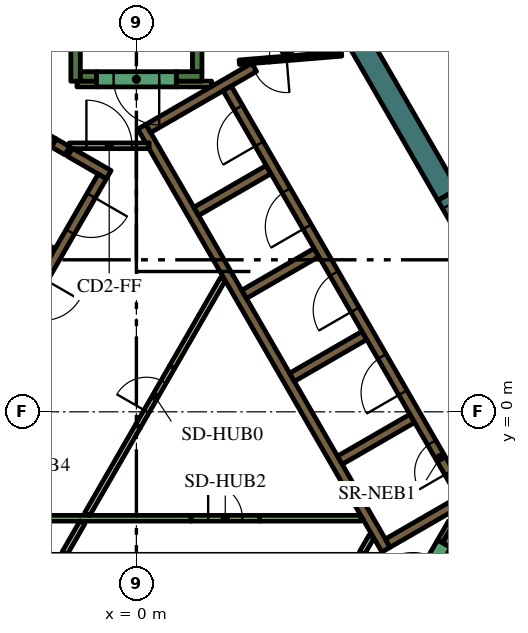
"""IFC4 building model, lengths in metres.
Left out: names, types, materials, properties, quantities, classifications, styles, units other than length and angle.
Written with IfcOpenShell. Run it as: python <this file> out.ifc"""

import sys

from ifc_helpers import new_model, si_unit, direction, frame, frame_2d, origin, place, context, subcontext, project, spatial, polyline, rectangle, outline, extrude, element, fill, save


model = new_model("IFC4")
c1 = context("Model", 3, precision=1e-05, world=origin(), true_north=direction((0.0, 1.0)))
c2 = subcontext(c1, "Body", "Model", "MODEL_VIEW")
j1 = project(units=[si_unit("LENGTHUNIT", "METRE"), si_unit("PLANEANGLEUNIT", "RADIAN")], contexts=[c1])
p1 = place(None, origin())
s1 = spatial("IfcSite", under=j1, at=p1, CompositionType="ELEMENT")
p2 = place(p1, origin())
s2 = spatial("IfcBuilding", under=s1, at=p2, CompositionType="ELEMENT")
p3 = place(p2, frame((0.0, 0.0, 288.0)))
s3 = spatial("IfcBuildingStorey", under=s2, at=p3, CompositionType="ELEMENT", Elevation=288.0)
p4 = place(p3, frame((1.989, 16.456, 0.0), z_axis=(0.0, 0.0, 1.0), x_axis=(0.49999102663, -0.8660305845, 0.0)))
e1 = element("IfcWall", 1, at=p4, inside=s3, PredefinedType="SOLIDWALL", context=c2, shape_type="SweptSolid", body=[
    extrude(rectangle(XDim=12.406, YDim=0.6, at=frame_2d((6.203, 0.0))), origin(), (0.0, 0.0, 1.0), 4.2),
])
p5 = place(p3, frame((8.163, -3.511, 0.0), z_axis=(0.0, 0.0, 1.0), x_axis=(0.500127794843, 0.865951608824, 0.0)))
e2 = element("IfcWall", 2, at=p5, inside=s3, PredefinedType="SOLIDWALL", context=c2, shape_type="SweptSolid", body=[
    extrude(rectangle(XDim=0.435, YDim=0.25, at=frame_2d((0.217, 0.0))), origin(), (0.0, 0.0, 1.0), 4.2),
])
p6 = place(p3, frame((1.6, 8.95, 0.0), z_axis=(0.0, 0.0, 1.0), x_axis=(0.0, 1.0, 0.0)))
e3 = element("IfcWall", 3, at=p6, inside=s3, PredefinedType="SOLIDWALL", context=c2, shape_type="SweptSolid", body=[
    extrude(rectangle(XDim=6.8, YDim=0.25, at=frame_2d((3.4, 0.0))), origin(), (0.0, 0.0, 1.0), 4.2),
])
p7 = place(p3, frame((1.05, 8.825, 0.0), z_axis=(0.0, 0.0, 1.0), x_axis=(1.0, 0.0, 0.0)))
e4 = element("IfcWall", 4, at=p7, inside=s3, PredefinedType="SOLIDWALL", context=c2, shape_type="SweptSolid", body=[
    extrude(rectangle(XDim=0.675, YDim=0.25, at=frame_2d((0.337, 0.0))), origin(), (0.0, 0.0, 1.0), 4.2),
])
p8 = place(p3, frame((-1.6, 8.7, 0.0), z_axis=(0.0, 0.0, 1.0), x_axis=(0.0, 1.0, 0.0)))
e5 = element("IfcWall", 5, at=p8, inside=s3, PredefinedType="SOLIDWALL", context=c2, shape_type="SweptSolid", body=[
    extrude(rectangle(XDim=7.05, YDim=0.25, at=frame_2d((3.525, 0.0))), origin(), (0.0, 0.0, 1.0), 4.2),
])
p9 = place(p3, frame((-1.475, 8.825, 0.0), z_axis=(0.0, 0.0, 1.0), x_axis=(1.0, 0.0, 0.0)))
e6 = element("IfcWall", 6, at=p9, inside=s3, PredefinedType="SOLIDWALL", context=c2, shape_type="SweptSolid", body=[
    extrude(rectangle(XDim=0.425, YDim=0.25, at=frame_2d((0.212, 0.0))), origin(), (0.0, 0.0, 1.0), 4.2),
])
p10 = place(p3, origin())
e7 = element("IfcWall", 7, at=p10, inside=s3, PredefinedType="SOLIDWALL", context=c2, shape_type="SweptSolid", body=[
    extrude(outline(polyline([(0.332, 6.925), (0.335, 6.925), (0.335, 6.925), (0.335, 6.925), (0.335, 7.075), (0.335, 7.075), (0.335, 7.075), (0.245, 7.075), (0.035, 7.439), (0.252, 7.564), (0.377, 7.348), (1.512, 5.382), (1.637, 5.165), (2.221, 4.153), (2.771, 3.199), (2.896, 2.983), (3.138, 2.564), (4.031, 1.017), (4.156, 0.801), (5.292, -1.165), (5.417, -1.382), (6.073, -2.519), (6.552, -3.348), (6.677, -3.564), (6.46, -3.689), (0.332, 6.925)])), origin(), (0.0, 0.0, 1.0), 4.2),
])
p11 = place(p3, frame((3.1, 9.064, 0.0), z_axis=(0.0, 0.0, 1.0), x_axis=(-0.866030133475, -0.499991807846, 0.0)))
e8 = element("IfcWall", 8, at=p11, inside=s3, PredefinedType="SOLIDWALL", context=c2, shape_type="SweptSolid", body=[
    extrude(rectangle(XDim=3.217, YDim=0.25, at=frame_2d((1.608, 0.0))), origin(), (0.0, 0.0, 1.0), 4.2),
])
p12 = place(p3, frame((1.574, 5.274, 0.0), z_axis=(0.0, 0.0, 1.0), x_axis=(0.866028486751, 0.499994660107, 0.0)))
e9 = element("IfcWall", 9, at=p12, inside=s3, PredefinedType="SOLIDWALL", context=c2, shape_type="SweptSolid", body=[
    extrude(rectangle(XDim=2.2, YDim=0.25, at=frame_2d((1.1, 0.0))), origin(), (0.0, 0.0, 1.0), 4.2),
])
for number, where, z_axis, x_axis in (
    (10, (2.834, 3.091, 0.0), (0.0, 0.0, 1.0), (0.866, 0.5, 0.0)),
    (11, (4.094, 0.909, 0.0), (0.0, 0.0, 1.0), (0.866, 0.5, 0.0)),
    (12, (5.354, -1.274, 0.0), (0.0, 0.0, 1.0), (0.866, 0.5, 0.0)),
):
    element("IfcWall", number, at=place(p3, frame(where, z_axis=z_axis, x_axis=x_axis)), inside=s3, PredefinedType="SOLIDWALL", context=c2, shape_type="SweptSolid", body=[
        extrude(rectangle(XDim=2.2, YDim=0.25, at=frame_2d((1.1, 0.0))), origin(), (0.0, 0.0, 1.0), 4.2),
    ])
p13 = place(p3, frame((11.507, -0.631, 0.0), z_axis=(0.0, 0.0, 1.0), x_axis=(-0.866011447264, -0.500024172624, 0.0)))
e13 = element("IfcWall", 13, at=p13, inside=s3, PredefinedType="SOLIDWALL", context=c2, shape_type="SweptSolid", body=[
    extrude(rectangle(XDim=5.65, YDim=0.25, at=frame_2d((2.825, 0.0))), origin(), (0.0, 0.0, 1.0), 4.2),
])
p14 = place(p3, frame((3.83, 9.486, 0.0), z_axis=(0.0, 0.0, 1.0), x_axis=(0.865986202621, 0.500067892261, 0.0)))
e14 = element("IfcWall", 14, at=p14, inside=s3, PredefinedType="SOLIDWALL", context=c2, shape_type="SweptSolid", body=[
    extrude(rectangle(XDim=1.591, YDim=0.25, at=frame_2d((0.795, 0.0))), origin(), (0.0, 0.0, 1.0), 4.2),
])
p15 = place(p3, frame((-1.819, 6.87, 0.0), z_axis=(0.0, 0.0, 1.0), x_axis=(-0.866294599386, 0.499533449405, 0.0)))
e15 = element("IfcWall", 15, at=p15, inside=s3, PredefinedType="SOLIDWALL", context=c2, shape_type="SweptSolid", body=[
    extrude(rectangle(XDim=0.41, YDim=0.25, at=frame_2d((0.205, 0.0))), origin(), (0.0, 0.0, 1.0), 4.2),
])
p16 = place(p3, frame((-2.849, 7.465, 0.0), z_axis=(0.0, 0.0, 1.0), x_axis=(0.865955664968, -0.500120771724, 0.0)))
e16 = element("IfcWall", 16, at=p16, inside=s3, PredefinedType="SOLIDWALL", context=c2, shape_type="SweptSolid", body=[
    extrude(rectangle(XDim=0.778, YDim=0.25, at=frame_2d((0.389, 0.0))), origin(), (0.0, 0.0, 1.0), 4.2),
])
p17 = place(p3, frame((-0.728, 6.24, 0.0), z_axis=(0.0, 0.0, 1.0), x_axis=(-0.866002680491, 0.500039355833, 0.0)))
e17 = element("IfcWall", 17, at=p17, inside=s3, PredefinedType="SOLIDWALL", context=c2, shape_type="SweptSolid", body=[
    extrude(rectangle(XDim=1.178, YDim=0.25, at=frame_2d((0.589, 0.0))), origin(), (0.0, 0.0, 1.0), 4.2),
])
p18 = place(p3, frame((-2.204, 4.182, 0.0), z_axis=(0.0, 0.0, 1.0), x_axis=(-0.866008176907, 0.50002983664, 0.0)))
e18 = element("IfcWall", 18, at=p18, inside=s3, PredefinedType="SOLIDWALL", context=c2, shape_type="SweptSolid", body=[
    extrude(rectangle(XDim=2.2, YDim=0.25, at=frame_2d((1.1, 0.0))), origin(), (0.0, 0.0, 1.0), 4.2),
])
p19 = place(p3, frame((0.941, 1.179, 0.0), z_axis=(0.0, 0.0, 1.0), x_axis=(0.499962406319, 0.866047107418, 0.0)))
e19 = element("IfcWall", 19, at=p19, inside=s3, PredefinedType="PARTITIONING", context=c2, shape_type="SweptSolid", body=[
    extrude(rectangle(XDim=2.672, YDim=0.15, at=frame_2d((1.336, 0.0))), origin(), (0.0, 0.0, 1.0), 3.55),
])
p20 = place(p3, frame((1.438, -2.8, 0.0), z_axis=(0.0, 0.0, 1.0), x_axis=(-1.0, 0.0, 0.0)))
e20 = element("IfcWall", 20, at=p20, inside=s3, PredefinedType="PARTITIONING", context=c2, shape_type="SweptSolid", body=[
    extrude(rectangle(XDim=7.781, YDim=0.15, at=frame_2d((3.891, 0.0))), origin(), (0.0, 0.0, 1.0), 3.55),
])
p21 = place(p3, frame((-1.418, -2.907, 0.0), z_axis=(0.0, 0.0, 1.0), x_axis=(-0.499978056798, -0.866038072327, 0.0)))
e21 = element("IfcWall", 21, at=p21, inside=s3, PredefinedType="PARTITIONING", context=c2, shape_type="SweptSolid", body=[
    extrude(rectangle(XDim=0.937, YDim=0.15, at=frame_2d((0.469, 0.0))), origin(), (0.0, 0.0, 1.0), 3.55),
])
for number, where, z_axis, x_axis in (
    (22, (-1.295, -2.693, 0.0), (0.0, 0.0, 1.0), (0.5, 0.866, 0.0)),
    (23, (3.238, -2.8, 0.0), (0.0, 0.0, 1.0), (1.0, 0.0, 0.0)),
):
    element("IfcWall", number, at=place(p3, frame(where, z_axis=z_axis, x_axis=x_axis)), inside=s3, PredefinedType="PARTITIONING", context=c2, shape_type="SweptSolid", body=[
        extrude(rectangle(XDim=2.672, YDim=0.15, at=frame_2d((1.336, 0.0))), origin(), (0.0, 0.0, 1.0), 3.55),
    ])
p22 = place(p3, frame((1.05, 8.625, 0.0), z_axis=(0.0, 0.0, 1.0), x_axis=(1.0, 0.0, 0.0)))
e24 = element("IfcWall", 24, at=p22, inside=s3, PredefinedType="PARTITIONING", context=c2, shape_type="SweptSolid", body=[
    extrude(rectangle(XDim=0.929, YDim=0.15, at=frame_2d((0.464, 0.0))), origin(), (0.0, 0.0, 1.0), 3.55),
])
p23 = place(p3, frame((-1.564, 8.625, 0.0), z_axis=(0.0, 0.0, 1.0), x_axis=(1.0, 0.0, 0.0)))
e25 = element("IfcWall", 25, at=p23, inside=s3, PredefinedType="PARTITIONING", context=c2, shape_type="SweptSolid", body=[
    extrude(rectangle(XDim=0.514, YDim=0.15, at=frame_2d((0.257, 0.0))), origin(), (0.0, 0.0, 1.0), 3.55),
])
p24 = place(p3, frame((8.281, -2.907, 0.0), z_axis=(0.0, 0.0, 1.0), x_axis=(-0.500193841991, -0.86591346013, 0.0)))
e26 = element("IfcWall", 26, at=p24, inside=s3, PredefinedType="PARTITIONING", context=c2, shape_type="SweptSolid", body=[
    extrude(rectangle(XDim=0.583, YDim=0.15, at=frame_2d((0.292, 0.0))), origin(), (0.0, 0.0, 1.0), 4.2),
])
p25 = place(p3, frame((5.936, -3.718, 0.0), z_axis=(0.0, 0.0, 1.0), x_axis=(0.499890179513, 0.866088799389, 0.0)))
e27 = element("IfcWall", 27, at=p25, inside=s3, PredefinedType="PARTITIONING", context=c2, shape_type="SweptSolid", body=[
    extrude(rectangle(XDim=0.504, YDim=0.15, at=frame_2d((0.252, 0.0))), origin(), (0.0, 0.0, 1.0), 3.55),
])
p26 = place(p3, frame((8.565, -2.185, 0.0), z_axis=(0.0, 0.0, 1.0), x_axis=(-0.499997954832, 0.866026584559, 0.0)))
e28 = element("IfcWall", 28, at=p26, inside=s3, PredefinedType="SOLIDWALL", context=c2, shape_type="SweptSolid", body=[
    extrude(rectangle(XDim=12.35, YDim=0.25, at=frame_2d((6.175, 0.0))), origin(), (0.0, 0.0, 1.0), 4.2),
])
p27 = place(p26, frame((0.685, 0.0, 0.0)))
e29 = element("IfcOpeningElement", 29, at=p27, cuts=e28, PredefinedType="OPENING", context=c2, shape_type="SweptSolid", body=[
    extrude(rectangle(XDim=0.9, YDim=2.1, at=frame_2d((0.45, 1.05))), frame((0.0, 0.135, 0.0), z_axis=(0.0, -1.0, 0.0), x_axis=(1.0, 0.0, 0.0)), (0.0, 0.0, 1.0), 0.27),
])
p28 = place(p26, frame((3.105, 0.0, 0.0)))
e30 = element("IfcOpeningElement", 30, at=p28, cuts=e28, PredefinedType="OPENING", context=c2, shape_type="SweptSolid", body=[
    extrude(rectangle(XDim=1.1, YDim=2.1, at=frame_2d((0.55, 1.05))), frame((0.0, 0.135, 0.0), z_axis=(0.0, -1.0, 0.0), x_axis=(1.0, 0.0, 0.0)), (0.0, 0.0, 1.0), 0.27),
])
p29 = place(p26, frame((5.625, 0.0, 0.0)))
e31 = element("IfcOpeningElement", 31, at=p29, cuts=e28, PredefinedType="OPENING", context=c2, shape_type="SweptSolid", body=[
    extrude(rectangle(XDim=1.1, YDim=2.1, at=frame_2d((0.55, 1.05))), frame((0.0, 0.135, 0.0), z_axis=(0.0, -1.0, 0.0), x_axis=(1.0, 0.0, 0.0)), (0.0, 0.0, 1.0), 0.27),
])
p30 = place(p26, frame((8.145, 0.0, 0.0)))
e32 = element("IfcOpeningElement", 32, at=p30, cuts=e28, PredefinedType="OPENING", context=c2, shape_type="SweptSolid", body=[
    extrude(rectangle(XDim=1.1, YDim=2.1, at=frame_2d((0.55, 1.05))), frame((0.0, 0.135, 0.0), z_axis=(0.0, -1.0, 0.0), x_axis=(1.0, 0.0, 0.0)), (0.0, 0.0, 1.0), 0.27),
])
p31 = place(p26, frame((10.665, 0.0, 0.0)))
e33 = element("IfcOpeningElement", 33, at=p31, cuts=e28, PredefinedType="OPENING", context=c2, shape_type="SweptSolid", body=[
    extrude(rectangle(XDim=1.1, YDim=2.1, at=frame_2d((0.55, 1.05))), frame((0.0, 0.135, 0.0), z_axis=(0.0, -1.0, 0.0), x_axis=(1.0, 0.0, 0.0)), (0.0, 0.0, 1.0), 0.27),
])
p32 = place(p3, frame((-0.898, 6.194, 0.0), z_axis=(0.0, 0.0, 1.0), x_axis=(-0.499996202215, -0.866027596426, 0.0)))
e34 = element("IfcWall", 34, at=p32, inside=s3, PredefinedType="SOLIDWALL", context=c2, shape_type="SweptSolid", body=[
    extrude(rectangle(XDim=9.83, YDim=0.25, at=frame_2d((4.915, 0.0))), origin(), (0.0, 0.0, 1.0), 4.2),
])
p33 = place(p32, frame((0.585, 0.0, 0.0)))
e35 = element("IfcOpeningElement", 35, at=p33, cuts=e34, PredefinedType="OPENING", context=c2, shape_type="SweptSolid", body=[
    extrude(rectangle(XDim=1.1, YDim=2.1, at=frame_2d((0.55, 1.05))), frame((0.0, 0.135, 0.0), z_axis=(0.0, -1.0, 0.0), x_axis=(1.0, 0.0, 0.0)), (0.0, 0.0, 1.0), 0.27),
])
p34 = place(p32, frame((3.105, 0.0, 0.0)))
e36 = element("IfcOpeningElement", 36, at=p34, cuts=e34, PredefinedType="OPENING", context=c2, shape_type="SweptSolid", body=[
    extrude(rectangle(XDim=1.1, YDim=2.1, at=frame_2d((0.55, 1.05))), frame((0.0, 0.135, 0.0), z_axis=(0.0, -1.0, 0.0), x_axis=(1.0, 0.0, 0.0)), (0.0, 0.0, 1.0), 0.27),
])
p35 = place(p32, frame((5.625, 0.0, 0.0)))
e37 = element("IfcOpeningElement", 37, at=p35, cuts=e34, PredefinedType="OPENING", context=c2, shape_type="SweptSolid", body=[
    extrude(rectangle(XDim=1.1, YDim=2.1, at=frame_2d((0.55, 1.05))), frame((0.0, 0.135, 0.0), z_axis=(0.0, -1.0, 0.0), x_axis=(1.0, 0.0, 0.0)), (0.0, 0.0, 1.0), 0.27),
])
p36 = place(p32, frame((8.145, 0.0, 0.0)))
e38 = element("IfcOpeningElement", 38, at=p36, cuts=e34, PredefinedType="OPENING", context=c2, shape_type="SweptSolid", body=[
    extrude(rectangle(XDim=1.1, YDim=2.1, at=frame_2d((0.55, 1.05))), frame((0.0, 0.135, 0.0), z_axis=(0.0, -1.0, 0.0), x_axis=(1.0, 0.0, 0.0)), (0.0, 0.0, 1.0), 0.27),
])
p37 = place(p3, frame((7.048, -5.292, 0.0), z_axis=(0.0, 0.0, 1.0), x_axis=(0.49994051562, 0.866059744384, 0.0)))
e39 = element("IfcWall", 39, at=p37, inside=s3, PredefinedType="SOLIDWALL", context=c2, shape_type="SweptSolid", body=[
    extrude(rectangle(XDim=2.1, YDim=0.4, at=frame_2d((1.05, 0.0))), origin(), (0.0, 0.0, 1.0), 4.2),
])
p38 = place(p37, frame((0.45, 0.0, 0.0)))
e40 = element("IfcOpeningElement", 40, at=p38, cuts=e39, PredefinedType="OPENING", context=c2, shape_type="SweptSolid", body=[
    extrude(rectangle(XDim=1.2, YDim=2.1, at=frame_2d((0.6, 1.05))), frame((0.0, 0.21, 0.0), z_axis=(0.0, -1.0, 0.0), x_axis=(1.0, 0.0, 0.0)), (0.0, 0.0, 1.0), 0.42),
])
p39 = place(p3, frame((1.05, 8.75, 0.0), z_axis=(0.0, 0.0, 1.0), x_axis=(-1.0, 0.0, 0.0)))
e41 = element("IfcWall", 41, at=p39, inside=s3, PredefinedType="SOLIDWALL", context=c2, shape_type="SweptSolid", body=[
    extrude(rectangle(XDim=2.1, YDim=0.4, at=frame_2d((1.05, 0.0))), origin(), (0.0, 0.0, 1.0), 4.2),
])
p40 = place(p39, frame((0.45, 0.0, 0.0)))
e42 = element("IfcOpeningElement", 42, at=p40, cuts=e41, PredefinedType="OPENING", context=c2, shape_type="SweptSolid", body=[
    extrude(rectangle(XDim=1.2, YDim=2.1, at=frame_2d((0.6, 1.05))), frame((0.0, 0.21, 0.0), z_axis=(0.0, -1.0, 0.0), x_axis=(1.0, 0.0, 0.0)), (0.0, 0.0, 1.0), 0.42),
])
p41 = place(p3, frame((5.398, 9.419, 0.0), z_axis=(0.0, 0.0, 1.0), x_axis=(-0.996653416376, -0.081743303248, 0.0)))
e43 = element("IfcWall", 43, at=p41, inside=s3, PredefinedType="PARTITIONING", context=c2, shape_type="SweptSolid", body=[
    extrude(rectangle(XDim=2.7, YDim=0.12, at=frame_2d((1.35, 0.0))), origin(), (0.0, 0.0, 1.0), 3.55),
])
p42 = place(p41, frame((1.45, 0.0, 0.0)))
e44 = element("IfcOpeningElement", 44, at=p42, cuts=e43, PredefinedType="OPENING", context=c2, shape_type="SweptSolid", body=[
    extrude(rectangle(XDim=0.9, YDim=2.1, at=frame_2d((0.45, 1.05))), frame((0.0, 0.07, 0.0), z_axis=(0.0, -1.0, 0.0), x_axis=(1.0, 0.0, 0.0)), (0.0, 0.0, 1.0), 0.14),
])
p43 = place(p3, frame((-1.765, 7.0, 0.0), z_axis=(0.0, 0.0, 1.0), x_axis=(1.0, 0.0, 0.0)))
e45 = element("IfcWall", 45, at=p43, inside=s3, PredefinedType="PARTITIONING", context=c2, shape_type="SweptSolid", body=[
    extrude(rectangle(XDim=2.1, YDim=0.15, at=frame_2d((1.05, 0.0))), origin(), (0.0, 0.0, 1.0), 3.55),
])
p44 = place(p43, frame((0.45, 0.0, 0.0)))
e46 = element("IfcOpeningElement", 46, at=p44, cuts=e45, PredefinedType="OPENING", context=c2, shape_type="SweptSolid", body=[
    extrude(rectangle(XDim=1.2, YDim=2.1, at=frame_2d((0.6, 1.05))), frame((0.0, 0.085, 0.0), z_axis=(0.0, -1.0, 0.0), x_axis=(1.0, 0.0, 0.0)), (0.0, 0.0, 1.0), 0.17),
])
p45 = place(p3, frame((8.192, 5.711, 0.0), z_axis=(0.0, 0.0, 1.0), x_axis=(0.500062241894, -0.865989465428, 0.0)))
e47 = element("IfcWall", 47, at=p45, inside=s3, PredefinedType="SOLIDWALL", context=c2, shape_type="SweptSolid", body=[
    extrude(rectangle(XDim=1.7, YDim=0.6, at=frame_2d((0.85, 0.0))), origin(), (0.0, 0.0, 1.0), 4.2),
])
p46 = place(p45, frame((0.25, 0.0, 0.0)))
e48 = element("IfcOpeningElement", 48, at=p46, cuts=e47, PredefinedType="OPENING", context=c2, shape_type="SweptSolid", body=[
    extrude(rectangle(XDim=1.2, YDim=2.1, at=frame_2d((0.6, 1.05))), frame((0.0, 0.31, 0.0), z_axis=(0.0, -1.0, 0.0), x_axis=(1.0, 0.0, 0.0)), (0.0, 0.0, 1.0), 0.62),
])
p47 = place(p3, frame((0.041, -0.379, 0.0), z_axis=(0.0, 0.0, 1.0), x_axis=(0.499961193289, 0.866047807691, 0.0)))
e49 = element("IfcWall", 49, at=p47, inside=s3, PredefinedType="PARTITIONING", context=c2, shape_type="SweptSolid", body=[
    extrude(rectangle(XDim=1.8, YDim=0.15, at=frame_2d((0.9, 0.0))), origin(), (0.0, 0.0, 1.0), 3.55),
])
p48 = place(p47, frame((0.45, 0.0, 0.0)))
e50 = element("IfcOpeningElement", 50, at=p48, cuts=e49, PredefinedType="OPENING", context=c2, shape_type="SweptSolid", body=[
    extrude(rectangle(XDim=0.9, YDim=2.1, at=frame_2d((0.45, 1.05))), frame((0.0, 0.085, 0.0), z_axis=(0.0, -1.0, 0.0), x_axis=(1.0, 0.0, 0.0)), (0.0, 0.0, 1.0), 0.17),
])
p49 = place(p3, frame((1.438, -2.8, 0.0), z_axis=(0.0, 0.0, 1.0), x_axis=(1.0, 0.0, 0.0)))
e51 = element("IfcWall", 51, at=p49, inside=s3, PredefinedType="PARTITIONING", context=c2, shape_type="SweptSolid", body=[
    extrude(rectangle(XDim=1.8, YDim=0.15, at=frame_2d((0.9, 0.0))), origin(), (0.0, 0.0, 1.0), 3.55),
])
p50 = place(p49, frame((0.45, 0.0, 0.0)))
e52 = element("IfcOpeningElement", 52, at=p50, cuts=e51, PredefinedType="OPENING", context=c2, shape_type="SweptSolid", body=[
    extrude(rectangle(XDim=0.9, YDim=2.1, at=frame_2d((0.45, 1.05))), frame((0.0, 0.085, 0.0), z_axis=(0.0, -1.0, 0.0), x_axis=(1.0, 0.0, 0.0)), (0.0, 0.0, 1.0), 0.17),
])
p51 = place(p3, frame((8.792, 8.873, 0.0), z_axis=(0.0, 0.0, 1.0), x_axis=(-0.499992600721, 0.866029675718, 0.0)))
e53 = element("IfcWall", 53, at=p51, inside=s3, PredefinedType="PARTITIONING", context=c2, shape_type="SweptSolid", body=[
    extrude(rectangle(XDim=2.712, YDim=0.2, at=frame_2d((1.356, 0.0))), origin(), (0.0, 0.0, 1.0), 3.55),
])
p52 = place(p27, origin())
e54 = element("IfcDoor", 54, at=p52, inside=s3, OperationType="SINGLE_SWING_LEFT", PredefinedType="DOOR", context=c2, shape_type="SweptSolid", body=[
    extrude(rectangle(XDim=0.9, YDim=2.1, at=frame_2d((0.45, 1.05))), frame((0.0, 0.025, 0.0), z_axis=(0.0, -1.0, 0.0), x_axis=(1.0, 0.0, 0.0)), (0.0, 0.0, 1.0), 0.05),
])
fill(e29, e54)
p53 = place(p28, origin())
e55 = element("IfcDoor", 55, at=p53, inside=s3, OperationType="DOUBLE_DOOR_SLIDING", PredefinedType="DOOR", context=c2, shape_type="SweptSolid", body=[
    extrude(rectangle(XDim=1.1, YDim=2.1, at=frame_2d((0.55, 1.05))), frame((0.0, 0.025, 0.0), z_axis=(0.0, -1.0, 0.0), x_axis=(1.0, 0.0, 0.0)), (0.0, 0.0, 1.0), 0.05),
])
fill(e30, e55)
p54 = place(p29, origin())
e56 = element("IfcDoor", 56, at=p54, inside=s3, OperationType="DOUBLE_DOOR_SLIDING", PredefinedType="DOOR", context=c2, shape_type="SweptSolid", body=[
    extrude(rectangle(XDim=1.1, YDim=2.1, at=frame_2d((0.55, 1.05))), frame((0.0, 0.025, 0.0), z_axis=(0.0, -1.0, 0.0), x_axis=(1.0, 0.0, 0.0)), (0.0, 0.0, 1.0), 0.05),
])
fill(e31, e56)
p55 = place(p30, origin())
e57 = element("IfcDoor", 57, at=p55, inside=s3, OperationType="DOUBLE_DOOR_SLIDING", PredefinedType="DOOR", context=c2, shape_type="SweptSolid", body=[
    extrude(rectangle(XDim=1.1, YDim=2.1, at=frame_2d((0.55, 1.05))), frame((0.0, 0.025, 0.0), z_axis=(0.0, -1.0, 0.0), x_axis=(1.0, 0.0, 0.0)), (0.0, 0.0, 1.0), 0.05),
])
fill(e32, e57)
p56 = place(p31, origin())
e58 = element("IfcDoor", 58, at=p56, inside=s3, OperationType="DOUBLE_DOOR_SLIDING", PredefinedType="DOOR", context=c2, shape_type="SweptSolid", body=[
    extrude(rectangle(XDim=1.1, YDim=2.1, at=frame_2d((0.55, 1.05))), frame((0.0, 0.025, 0.0), z_axis=(0.0, -1.0, 0.0), x_axis=(1.0, 0.0, 0.0)), (0.0, 0.0, 1.0), 0.05),
])
fill(e33, e58)
p57 = place(p33, origin())
e59 = element("IfcDoor", 59, at=p57, inside=s3, OperationType="DOUBLE_DOOR_SLIDING", PredefinedType="DOOR", context=c2, shape_type="SweptSolid", body=[
    extrude(rectangle(XDim=1.1, YDim=2.1, at=frame_2d((0.55, 1.05))), frame((0.0, 0.025, 0.0), z_axis=(0.0, -1.0, 0.0), x_axis=(1.0, 0.0, 0.0)), (0.0, 0.0, 1.0), 0.05),
])
fill(e35, e59)
p58 = place(p40, origin())
e60 = element("IfcDoor", 60, at=p58, inside=s3, OperationType="SINGLE_SWING_LEFT", PredefinedType="DOOR", context=c2, shape_type="SweptSolid", body=[
    extrude(rectangle(XDim=1.2, YDim=2.1, at=frame_2d((0.6, 1.05))), frame((0.0, 0.025, 0.0), z_axis=(0.0, -1.0, 0.0), x_axis=(1.0, 0.0, 0.0)), (0.0, 0.0, 1.0), 0.05),
])
fill(e42, e60)
p59 = place(p42, origin())
e61 = element("IfcDoor", 61, at=p59, inside=s3, OperationType="SINGLE_SWING_LEFT", PredefinedType="DOOR", context=c2, shape_type="SweptSolid", body=[
    extrude(rectangle(XDim=0.9, YDim=2.1, at=frame_2d((0.45, 1.05))), frame((0.0, 0.025, 0.0), z_axis=(0.0, -1.0, 0.0), x_axis=(1.0, 0.0, 0.0)), (0.0, 0.0, 1.0), 0.05),
])
fill(e44, e61)
p60 = place(p44, origin())
e62 = element("IfcDoor", 62, at=p60, inside=s3, OperationType="SINGLE_SWING_LEFT", PredefinedType="DOOR", context=c2, shape_type="SweptSolid", body=[
    extrude(rectangle(XDim=1.2, YDim=2.1, at=frame_2d((0.6, 1.05))), frame((0.0, 0.025, 0.0), z_axis=(0.0, -1.0, 0.0), x_axis=(1.0, 0.0, 0.0)), (0.0, 0.0, 1.0), 0.05),
])
fill(e46, e62)
p61 = place(p48, origin())
e63 = element("IfcDoor", 63, at=p61, inside=s3, OperationType="SINGLE_SWING_LEFT", PredefinedType="DOOR", context=c2, shape_type="SweptSolid", body=[
    extrude(rectangle(XDim=0.9, YDim=2.1, at=frame_2d((0.45, 1.05))), frame((0.0, 0.025, 0.0), z_axis=(0.0, -1.0, 0.0), x_axis=(1.0, 0.0, 0.0)), (0.0, 0.0, 1.0), 0.05),
])
fill(e50, e63)
p62 = place(p50, origin())
e64 = element("IfcDoor", 64, at=p62, inside=s3, OperationType="SINGLE_SWING_LEFT", PredefinedType="DOOR", context=c2, shape_type="SweptSolid", body=[
    extrude(rectangle(XDim=0.9, YDim=2.1, at=frame_2d((0.45, 1.05))), frame((0.0, 0.025, 0.0), z_axis=(0.0, -1.0, 0.0), x_axis=(1.0, 0.0, 0.0)), (0.0, 0.0, 1.0), 0.05),
])
fill(e52, e64)
save(model, sys.argv[1])
